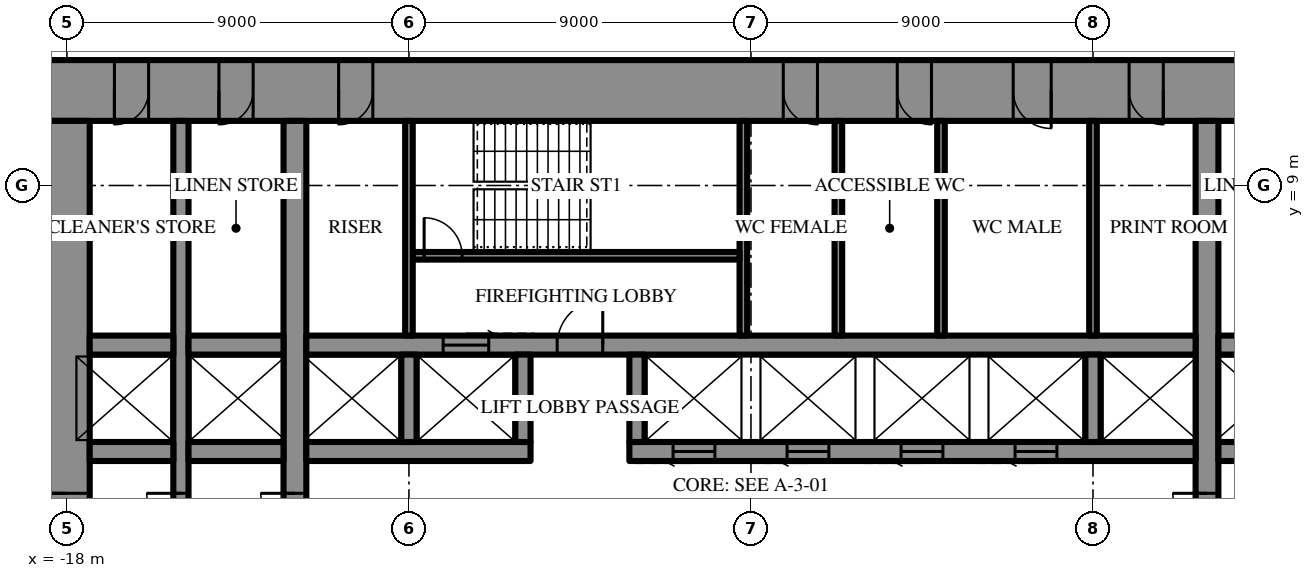
"""IFC4 building model, lengths in metres.
Left out: names, types, materials, properties, quantities, classifications, styles, units other than length and angle.
Written with IfcOpenShell. Run it as: python <this file> out.ifc"""

import sys

from ifc_helpers import new_model, si_unit, direction, frame, frame_2d, origin, place, context, subcontext, project, spatial, rectangle, extrude, element, fill, save


model = new_model("IFC4")
c1 = context("Model", 3, precision=1e-05, world=origin(), true_north=direction((0.0, 1.0)))
c2 = subcontext(c1, "Body", "Model", "MODEL_VIEW")
j1 = project(units=[si_unit("LENGTHUNIT", "METRE"), si_unit("PLANEANGLEUNIT", "RADIAN")], contexts=[c1])
p1 = place(None, origin())
s1 = spatial("IfcSite", under=j1, at=p1, CompositionType="ELEMENT")
p2 = place(p1, origin())
s2 = spatial("IfcBuilding", under=s1, at=p2, CompositionType="ELEMENT")
p3 = place(p2, frame((0.0, 0.0, 94.9)))
s3 = spatial("IfcBuildingStorey", under=s2, at=p3, CompositionType="ELEMENT", Elevation=94.9)
p4 = place(p3, frame((-18.6, 11.5, 0.0), z_axis=(0.0, 0.0, 1.0), x_axis=(1.0, 0.0, 0.0)))
e1 = element("IfcWall", 1, at=p4, inside=s3, PredefinedType="SHEAR", context=c2, shape_type="SweptSolid", body=[
    extrude(rectangle(XDim=37.2, YDim=1.6, at=frame_2d((18.6, 0.0))), origin(), (0.0, 0.0, 1.0), 4.2),
])
p5 = place(p4, frame((19.45, 0.0, 0.0)))
e2 = element("IfcOpeningElement", 2, at=p5, cuts=e1, PredefinedType="OPENING", context=c2, shape_type="SweptSolid", body=[
    extrude(rectangle(XDim=0.9, YDim=2.2, at=frame_2d((0.45, 1.1))), frame((0.0, 0.81, 0.0), z_axis=(0.0, -1.0, 0.0), x_axis=(1.0, 0.0, 0.0)), (0.0, 0.0, 1.0), 1.62),
])
p6 = place(p4, frame((22.45, 0.0, 0.0)))
e3 = element("IfcOpeningElement", 3, at=p6, cuts=e1, PredefinedType="OPENING", context=c2, shape_type="SweptSolid", body=[
    extrude(rectangle(XDim=0.9, YDim=2.2, at=frame_2d((0.45, 1.1))), frame((0.0, 0.81, 0.0), z_axis=(0.0, -1.0, 0.0), x_axis=(1.0, 0.0, 0.0)), (0.0, 0.0, 1.0), 1.62),
])
p7 = place(p4, frame((25.5, 0.0, 0.0)))
e4 = element("IfcOpeningElement", 4, at=p7, cuts=e1, PredefinedType="OPENING", context=c2, shape_type="SweptSolid", body=[
    extrude(rectangle(XDim=1.0, YDim=2.2, at=frame_2d((0.5, 1.1))), frame((0.0, 0.81, 0.0), z_axis=(0.0, -1.0, 0.0), x_axis=(1.0, 0.0, 0.0)), (0.0, 0.0, 1.0), 1.62),
])
p8 = place(p4, frame((1.85, 0.0, 0.0)))
e5 = element("IfcOpeningElement", 5, at=p8, cuts=e1, PredefinedType="OPENING", context=c2, shape_type="SweptSolid", body=[
    extrude(rectangle(XDim=0.9, YDim=2.2, at=frame_2d((0.45, 1.1))), frame((0.0, 0.81, 0.0), z_axis=(0.0, -1.0, 0.0), x_axis=(1.0, 0.0, 0.0)), (0.0, 0.0, 1.0), 1.62),
])
p9 = place(p4, frame((4.6, 0.0, 0.0)))
e6 = element("IfcOpeningElement", 6, at=p9, cuts=e1, PredefinedType="OPENING", context=c2, shape_type="SweptSolid", body=[
    extrude(rectangle(XDim=0.9, YDim=2.2, at=frame_2d((0.45, 1.1))), frame((0.0, 0.81, 0.0), z_axis=(0.0, -1.0, 0.0), x_axis=(1.0, 0.0, 0.0)), (0.0, 0.0, 1.0), 1.62),
])
p10 = place(p4, frame((7.75, 0.0, 0.0)))
e7 = element("IfcOpeningElement", 7, at=p10, cuts=e1, PredefinedType="OPENING", context=c2, shape_type="SweptSolid", body=[
    extrude(rectangle(XDim=0.9, YDim=2.2, at=frame_2d((0.45, 1.1))), frame((0.0, 0.81, 0.0), z_axis=(0.0, -1.0, 0.0), x_axis=(1.0, 0.0, 0.0)), (0.0, 0.0, 1.0), 1.62),
])
p11 = place(p4, frame((28.55, 0.0, 0.0)))
e8 = element("IfcOpeningElement", 8, at=p11, cuts=e1, PredefinedType="OPENING", context=c2, shape_type="SweptSolid", body=[
    extrude(rectangle(XDim=0.9, YDim=2.2, at=frame_2d((0.45, 1.1))), frame((0.0, 0.81, 0.0), z_axis=(0.0, -1.0, 0.0), x_axis=(1.0, 0.0, 0.0)), (0.0, 0.0, 1.0), 1.62),
])
p12 = place(p4, frame((31.7, 0.0, 0.0)))
e9 = element("IfcOpeningElement", 9, at=p12, cuts=e1, PredefinedType="OPENING", context=c2, shape_type="SweptSolid", body=[
    extrude(rectangle(XDim=0.9, YDim=2.2, at=frame_2d((0.45, 1.1))), frame((0.0, 0.81, 0.0), z_axis=(0.0, -1.0, 0.0), x_axis=(1.0, 0.0, 0.0)), (0.0, 0.0, 1.0), 1.62),
])
p13 = place(p4, frame((34.45, 0.0, 0.0)))
e10 = element("IfcOpeningElement", 10, at=p13, cuts=e1, PredefinedType="OPENING", context=c2, shape_type="SweptSolid", body=[
    extrude(rectangle(XDim=0.9, YDim=2.2, at=frame_2d((0.45, 1.1))), frame((0.0, 0.81, 0.0), z_axis=(0.0, -1.0, 0.0), x_axis=(1.0, 0.0, 0.0)), (0.0, 0.0, 1.0), 1.62),
])
p14 = place(p3, frame((-18.0, 10.7, 0.0), z_axis=(0.0, 0.0, 1.0), x_axis=(0.0, -1.0, 0.0)))
e11 = element("IfcWall", 11, at=p14, inside=s3, PredefinedType="SHEAR", context=c2, shape_type="SweptSolid", body=[
    extrude(rectangle(XDim=21.4, YDim=1.2, at=frame_2d((10.7, 0.0))), origin(), (0.0, 0.0, 1.0), 4.2),
])
p15 = place(p14, frame((9.8, 0.0, 0.0)))
e12 = element("IfcOpeningElement", 12, at=p15, cuts=e11, PredefinedType="OPENING", context=c2, shape_type="SweptSolid", body=[
    extrude(rectangle(XDim=1.8, YDim=2.4, at=frame_2d((0.9, 1.2))), frame((0.0, 0.61, 0.0), z_axis=(0.0, -1.0, 0.0), x_axis=(1.0, 0.0, 0.0)), (0.0, 0.0, 1.0), 1.22),
])
p16 = place(p3, frame((12.0, -10.7, 0.0), z_axis=(0.0, 0.0, 1.0), x_axis=(0.0, 1.0, 0.0)))
e13 = element("IfcWall", 13, at=p16, inside=s3, PredefinedType="SHEAR", context=c2, shape_type="SweptSolid", body=[
    extrude(rectangle(XDim=21.4, YDim=0.6, at=frame_2d((10.7, 0.0))), origin(), (0.0, 0.0, 1.0), 4.2),
])
p17 = place(p16, frame((9.8, 0.0, 0.0)))
e14 = element("IfcOpeningElement", 14, at=p17, cuts=e13, PredefinedType="OPENING", context=c2, shape_type="SweptSolid", body=[
    extrude(rectangle(XDim=1.8, YDim=2.4, at=frame_2d((0.9, 1.2))), frame((0.0, 0.31, 0.0), z_axis=(0.0, -1.0, 0.0), x_axis=(1.0, 0.0, 0.0)), (0.0, 0.0, 1.0), 0.62),
])
p18 = place(p3, frame((-12.0, -10.7, 0.0), z_axis=(0.0, 0.0, 1.0), x_axis=(0.0, 1.0, 0.0)))
e15 = element("IfcWall", 15, at=p18, inside=s3, PredefinedType="SHEAR", context=c2, shape_type="SweptSolid", body=[
    extrude(rectangle(XDim=21.4, YDim=0.6, at=frame_2d((10.7, 0.0))), origin(), (0.0, 0.0, 1.0), 4.2),
])
p19 = place(p18, frame((9.8, 0.0, 0.0)))
e16 = element("IfcOpeningElement", 16, at=p19, cuts=e15, PredefinedType="OPENING", context=c2, shape_type="SweptSolid", body=[
    extrude(rectangle(XDim=1.8, YDim=2.4, at=frame_2d((0.9, 1.2))), frame((0.0, 0.31, 0.0), z_axis=(0.0, -1.0, 0.0), x_axis=(1.0, 0.0, 0.0)), (0.0, 0.0, 1.0), 0.62),
])
p20 = place(p3, frame((-15.0, -10.7, 0.0), z_axis=(0.0, 0.0, 1.0), x_axis=(0.0, 1.0, 0.0)))
e17 = element("IfcWall", 17, at=p20, inside=s3, PredefinedType="SHEAR", context=c2, shape_type="SweptSolid", body=[
    extrude(rectangle(XDim=21.4, YDim=0.4, at=frame_2d((10.7, 0.0))), origin(), (0.0, 0.0, 1.0), 4.2),
])
p21 = place(p20, frame((9.8, 0.0, 0.0)))
e18 = element("IfcOpeningElement", 18, at=p21, cuts=e17, PredefinedType="OPENING", context=c2, shape_type="SweptSolid", body=[
    extrude(rectangle(XDim=1.8, YDim=2.4, at=frame_2d((0.9, 1.2))), frame((0.0, 0.21, 0.0), z_axis=(0.0, -1.0, 0.0), x_axis=(1.0, 0.0, 0.0)), (0.0, 0.0, 1.0), 0.42),
])
p22 = place(p3, frame((-17.4, 2.0, 0.0), z_axis=(0.0, 0.0, 1.0), x_axis=(1.0, 0.0, 0.0)))
e19 = element("IfcWall", 19, at=p22, inside=s3, PredefinedType="SHEAR", context=c2, shape_type="SweptSolid", body=[
    extrude(rectangle(XDim=2.2, YDim=0.5, at=frame_2d((1.1, 0.0))), origin(), (0.0, 0.0, 1.0), 4.2),
])
p23 = place(p3, frame((-14.8, 2.0, 0.0), z_axis=(0.0, 0.0, 1.0), x_axis=(1.0, 0.0, 0.0)))
e20 = element("IfcWall", 20, at=p23, inside=s3, PredefinedType="SHEAR", context=c2, shape_type="SweptSolid", body=[
    extrude(rectangle(XDim=2.5, YDim=0.5, at=frame_2d((1.25, 0.0))), origin(), (0.0, 0.0, 1.0), 4.2),
])
p24 = place(p3, frame((-11.7, 2.0, 0.0), z_axis=(0.0, 0.0, 1.0), x_axis=(1.0, 0.0, 0.0)))
e21 = element("IfcWall", 21, at=p24, inside=s3, PredefinedType="SHEAR", context=c2, shape_type="SweptSolid", body=[
    extrude(rectangle(XDim=5.9, YDim=0.5, at=frame_2d((2.95, 0.0))), origin(), (0.0, 0.0, 1.0), 4.2),
])
p25 = place(p3, frame((-3.2, 2.0, 0.0), z_axis=(0.0, 0.0, 1.0), x_axis=(1.0, 0.0, 0.0)))
e22 = element("IfcWall", 22, at=p25, inside=s3, PredefinedType="SHEAR", context=c2, shape_type="SweptSolid", body=[
    extrude(rectangle(XDim=14.9, YDim=0.5, at=frame_2d((7.45, 0.0))), origin(), (0.0, 0.0, 1.0), 4.2),
])
p26 = place(p25, frame((1.15, 0.0, 0.0)))
e23 = element("IfcOpeningElement", 23, at=p26, cuts=e22, PredefinedType="OPENING", context=c2, shape_type="SweptSolid", body=[
    extrude(rectangle(XDim=1.1, YDim=2.2, at=frame_2d((0.55, 1.1))), frame((0.0, 0.26, 0.0), z_axis=(0.0, -1.0, 0.0), x_axis=(1.0, 0.0, 0.0)), (0.0, 0.0, 1.0), 0.52),
])
p27 = place(p25, frame((4.15, 0.0, 0.0)))
e24 = element("IfcOpeningElement", 24, at=p27, cuts=e22, PredefinedType="OPENING", context=c2, shape_type="SweptSolid", body=[
    extrude(rectangle(XDim=1.1, YDim=2.2, at=frame_2d((0.55, 1.1))), frame((0.0, 0.26, 0.0), z_axis=(0.0, -1.0, 0.0), x_axis=(1.0, 0.0, 0.0)), (0.0, 0.0, 1.0), 0.52),
])
p28 = place(p25, frame((7.15, 0.0, 0.0)))
e25 = element("IfcOpeningElement", 25, at=p28, cuts=e22, PredefinedType="OPENING", context=c2, shape_type="SweptSolid", body=[
    extrude(rectangle(XDim=1.1, YDim=2.2, at=frame_2d((0.55, 1.1))), frame((0.0, 0.26, 0.0), z_axis=(0.0, -1.0, 0.0), x_axis=(1.0, 0.0, 0.0)), (0.0, 0.0, 1.0), 0.52),
])
p29 = place(p25, frame((10.15, 0.0, 0.0)))
e26 = element("IfcOpeningElement", 26, at=p29, cuts=e22, PredefinedType="OPENING", context=c2, shape_type="SweptSolid", body=[
    extrude(rectangle(XDim=1.1, YDim=2.2, at=frame_2d((0.55, 1.1))), frame((0.0, 0.26, 0.0), z_axis=(0.0, -1.0, 0.0), x_axis=(1.0, 0.0, 0.0)), (0.0, 0.0, 1.0), 0.52),
])
p30 = place(p3, frame((12.3, 2.0, 0.0), z_axis=(0.0, 0.0, 1.0), x_axis=(1.0, 0.0, 0.0)))
e27 = element("IfcWall", 27, at=p30, inside=s3, PredefinedType="SHEAR", context=c2, shape_type="SweptSolid", body=[
    extrude(rectangle(XDim=2.5, YDim=0.5, at=frame_2d((1.25, 0.0))), origin(), (0.0, 0.0, 1.0), 4.2),
])
p31 = place(p3, frame((-17.4, 4.8, 0.0), z_axis=(0.0, 0.0, 1.0), x_axis=(1.0, 0.0, 0.0)))
e28 = element("IfcWall", 28, at=p31, inside=s3, PredefinedType="SHEAR", context=c2, shape_type="SweptSolid", body=[
    extrude(rectangle(XDim=2.2, YDim=0.5, at=frame_2d((1.1, 0.0))), origin(), (0.0, 0.0, 1.0), 4.2),
])
p32 = place(p3, frame((-14.8, 4.8, 0.0), z_axis=(0.0, 0.0, 1.0), x_axis=(1.0, 0.0, 0.0)))
e29 = element("IfcWall", 29, at=p32, inside=s3, PredefinedType="SHEAR", context=c2, shape_type="SweptSolid", body=[
    extrude(rectangle(XDim=2.5, YDim=0.5, at=frame_2d((1.25, 0.0))), origin(), (0.0, 0.0, 1.0), 4.2),
])
p33 = place(p3, frame((-11.7, 4.8, 0.0), z_axis=(0.0, 0.0, 1.0), x_axis=(1.0, 0.0, 0.0)))
e30 = element("IfcWall", 30, at=p33, inside=s3, PredefinedType="SHEAR", context=c2, shape_type="SweptSolid", body=[
    extrude(rectangle(XDim=23.4, YDim=0.5, at=frame_2d((11.7, 0.0))), origin(), (0.0, 0.0, 1.0), 4.2),
])
p34 = place(p33, frame((6.6, 0.0, 0.0)))
e31 = element("IfcOpeningElement", 31, at=p34, cuts=e30, PredefinedType="OPENING", context=c2, shape_type="SweptSolid", body=[
    extrude(rectangle(XDim=1.2, YDim=2.2, at=frame_2d((0.6, 1.1))), frame((0.0, 0.26, 0.0), z_axis=(0.0, -1.0, 0.0), x_axis=(1.0, 0.0, 0.0)), (0.0, 0.0, 1.0), 0.52),
])
p35 = place(p33, frame((3.6, 0.0, 0.0)))
e32 = element("IfcOpeningElement", 32, at=p35, cuts=e30, PredefinedType="OPENING", context=c2, shape_type="SweptSolid", body=[
    extrude(rectangle(XDim=1.2, YDim=2.2, at=frame_2d((0.6, 1.1))), frame((0.0, 0.26, 0.0), z_axis=(0.0, -1.0, 0.0), x_axis=(1.0, 0.0, 0.0)), (0.0, 0.0, 1.0), 0.52),
])
p36 = place(p3, frame((12.3, 4.8, 0.0), z_axis=(0.0, 0.0, 1.0), x_axis=(1.0, 0.0, 0.0)))
e33 = element("IfcWall", 33, at=p36, inside=s3, PredefinedType="SHEAR", context=c2, shape_type="SweptSolid", body=[
    extrude(rectangle(XDim=2.5, YDim=0.5, at=frame_2d((1.25, 0.0))), origin(), (0.0, 0.0, 1.0), 4.2),
])
for number, where, z_axis, x_axis in (
    (34, (-9.0, 2.25, 0.0), (0.0, 0.0, 1.0), (0.0, 1.0, 0.0)),
    (35, (-6.0, 2.25, 0.0), (0.0, 0.0, 1.0), (0.0, 1.0, 0.0)),
    (36, (-3.0, 2.25, 0.0), (0.0, 0.0, 1.0), (0.0, 1.0, 0.0)),
    (37, (9.0, 2.25, 0.0), (0.0, 0.0, 1.0), (0.0, 1.0, 0.0)),
):
    element("IfcWall", number, at=place(p3, frame(where, z_axis=z_axis, x_axis=x_axis)), inside=s3, PredefinedType="SHEAR", context=c2, shape_type="SweptSolid", body=[
        extrude(rectangle(XDim=2.3, YDim=0.4, at=frame_2d((1.15, 0.0))), origin(), (0.0, 0.0, 1.0), 4.2),
    ])
p37 = place(p3, frame((-0.2, 5.05, 0.0), z_axis=(0.0, 0.0, 1.0), x_axis=(0.0, 1.0, 0.0)))
e38 = element("IfcWall", 38, at=p37, inside=s3, PredefinedType="SHEAR", context=c2, shape_type="SweptSolid", body=[
    extrude(rectangle(XDim=5.65, YDim=0.2, at=frame_2d((2.825, 0.0))), origin(), (0.0, 0.0, 1.0), 4.2),
])
p38 = place(p3, frame((-8.9, 7.15, 0.0), z_axis=(0.0, 0.0, 1.0), x_axis=(1.0, 0.0, 0.0)))
e39 = element("IfcWall", 39, at=p38, inside=s3, PredefinedType="SHEAR", context=c2, shape_type="SweptSolid", body=[
    extrude(rectangle(XDim=8.6, YDim=0.2, at=frame_2d((4.3, 0.0))), origin(), (0.0, 0.0, 1.0), 4.2),
])
p39 = place(p38, frame((0.3, 0.0, 0.0)))
e40 = element("IfcOpeningElement", 40, at=p39, cuts=e39, PredefinedType="OPENING", context=c2, shape_type="SweptSolid", body=[
    extrude(rectangle(XDim=1.0, YDim=2.2, at=frame_2d((0.5, 1.1))), frame((0.0, 0.11, 0.0), z_axis=(0.0, -1.0, 0.0), x_axis=(1.0, 0.0, 0.0)), (0.0, 0.0, 1.0), 0.22),
])
for number, where, z_axis, x_axis in (
    (41, (-9.0, 5.05, 0.0), (0.0, 0.0, 1.0), (0.0, 1.0, 0.0)),
    (42, (9.0, 5.05, 0.0), (0.0, 0.0, 1.0), (0.0, 1.0, 0.0)),
    (43, (2.3, 5.05, 0.0), (0.0, 0.0, 1.0), (0.0, 1.0, 0.0)),
    (44, (5.0, 5.05, 0.0), (0.0, 0.0, 1.0), (0.0, 1.0, 0.0)),
):
    element("IfcWall", number, at=place(p3, frame(where, z_axis=z_axis, x_axis=x_axis)), inside=s3, PredefinedType="PARTITIONING", context=c2, shape_type="SweptSolid", body=[
        extrude(rectangle(XDim=5.65, YDim=0.2, at=frame_2d((2.825, 0.0))), origin(), (0.0, 0.0, 1.0), 4.0),
    ])
p40 = place(p15, frame((1.8, 0.0, 0.0), z_axis=(0.0, 0.0, 1.0), x_axis=(-1.0, 0.0, 0.0)))
e45 = element("IfcDoor", 45, at=p40, inside=s3, OperationType="DOUBLE_DOOR_SINGLE_SWING", PredefinedType="DOOR", context=c2, shape_type="SweptSolid", body=[
    extrude(rectangle(XDim=1.8, YDim=2.4, at=frame_2d((0.9, 1.2))), frame((0.0, 0.025, 0.0), z_axis=(0.0, -1.0, 0.0), x_axis=(1.0, 0.0, 0.0)), (0.0, 0.0, 1.0), 0.05),
])
fill(e12, e45)
p41 = place(p34, origin())
e46 = element("IfcDoor", 46, at=p41, inside=s3, OperationType="SINGLE_SWING_LEFT", PredefinedType="DOOR", context=c2, shape_type="SweptSolid", body=[
    extrude(rectangle(XDim=1.2, YDim=2.2, at=frame_2d((0.6, 1.1))), frame((0.0, 0.025, 0.0), z_axis=(0.0, -1.0, 0.0), x_axis=(1.0, 0.0, 0.0)), (0.0, 0.0, 1.0), 0.05),
])
fill(e31, e46)
p42 = place(p39, origin())
e47 = element("IfcDoor", 47, at=p42, inside=s3, OperationType="SINGLE_SWING_RIGHT", PredefinedType="DOOR", context=c2, shape_type="SweptSolid", body=[
    extrude(rectangle(XDim=1.0, YDim=2.2, at=frame_2d((0.5, 1.1))), frame((0.0, 0.025, 0.0), z_axis=(0.0, -1.0, 0.0), x_axis=(1.0, 0.0, 0.0)), (0.0, 0.0, 1.0), 0.05),
])
fill(e40, e47)
p43 = place(p5, frame((0.9, 0.0, 0.0), z_axis=(0.0, 0.0, 1.0), x_axis=(-1.0, 0.0, 0.0)))
e48 = element("IfcDoor", 48, at=p43, inside=s3, OperationType="SINGLE_SWING_RIGHT", PredefinedType="DOOR", context=c2, shape_type="SweptSolid", body=[
    extrude(rectangle(XDim=0.9, YDim=2.2, at=frame_2d((0.45, 1.1))), frame((0.0, 0.025, 0.0), z_axis=(0.0, -1.0, 0.0), x_axis=(1.0, 0.0, 0.0)), (0.0, 0.0, 1.0), 0.05),
])
fill(e2, e48)
p44 = place(p6, frame((0.9, 0.0, 0.0), z_axis=(0.0, 0.0, 1.0), x_axis=(-1.0, 0.0, 0.0)))
e49 = element("IfcDoor", 49, at=p44, inside=s3, OperationType="SINGLE_SWING_RIGHT", PredefinedType="DOOR", context=c2, shape_type="SweptSolid", body=[
    extrude(rectangle(XDim=0.9, YDim=2.2, at=frame_2d((0.45, 1.1))), frame((0.0, 0.025, 0.0), z_axis=(0.0, -1.0, 0.0), x_axis=(1.0, 0.0, 0.0)), (0.0, 0.0, 1.0), 0.05),
])
fill(e3, e49)
p45 = place(p7, frame((1.0, 0.0, 0.0), z_axis=(0.0, 0.0, 1.0), x_axis=(-1.0, 0.0, 0.0)))
e50 = element("IfcDoor", 50, at=p45, inside=s3, OperationType="SINGLE_SWING_RIGHT", PredefinedType="DOOR", context=c2, shape_type="SweptSolid", body=[
    extrude(rectangle(XDim=1.0, YDim=2.2, at=frame_2d((0.5, 1.1))), frame((0.0, 0.025, 0.0), z_axis=(0.0, -1.0, 0.0), x_axis=(1.0, 0.0, 0.0)), (0.0, 0.0, 1.0), 0.05),
])
fill(e4, e50)
p46 = place(p8, frame((0.9, 0.0, 0.0), z_axis=(0.0, 0.0, 1.0), x_axis=(-1.0, 0.0, 0.0)))
e51 = element("IfcDoor", 51, at=p46, inside=s3, OperationType="SINGLE_SWING_LEFT", PredefinedType="DOOR", context=c2, shape_type="SweptSolid", body=[
    extrude(rectangle(XDim=0.9, YDim=2.2, at=frame_2d((0.45, 1.1))), frame((0.0, 0.025, 0.0), z_axis=(0.0, -1.0, 0.0), x_axis=(1.0, 0.0, 0.0)), (0.0, 0.0, 1.0), 0.05),
])
fill(e5, e51)
p47 = place(p9, frame((0.9, 0.0, 0.0), z_axis=(0.0, 0.0, 1.0), x_axis=(-1.0, 0.0, 0.0)))
e52 = element("IfcDoor", 52, at=p47, inside=s3, OperationType="SINGLE_SWING_LEFT", PredefinedType="DOOR", context=c2, shape_type="SweptSolid", body=[
    extrude(rectangle(XDim=0.9, YDim=2.2, at=frame_2d((0.45, 1.1))), frame((0.0, 0.025, 0.0), z_axis=(0.0, -1.0, 0.0), x_axis=(1.0, 0.0, 0.0)), (0.0, 0.0, 1.0), 0.05),
])
fill(e6, e52)
p48 = place(p10, frame((0.9, 0.0, 0.0), z_axis=(0.0, 0.0, 1.0), x_axis=(-1.0, 0.0, 0.0)))
e53 = element("IfcDoor", 53, at=p48, inside=s3, OperationType="SINGLE_SWING_LEFT", PredefinedType="DOOR", context=c2, shape_type="SweptSolid", body=[
    extrude(rectangle(XDim=0.9, YDim=2.2, at=frame_2d((0.45, 1.1))), frame((0.0, 0.025, 0.0), z_axis=(0.0, -1.0, 0.0), x_axis=(1.0, 0.0, 0.0)), (0.0, 0.0, 1.0), 0.05),
])
fill(e7, e53)
p49 = place(p11, frame((0.9, 0.0, 0.0), z_axis=(0.0, 0.0, 1.0), x_axis=(-1.0, 0.0, 0.0)))
e54 = element("IfcDoor", 54, at=p49, inside=s3, OperationType="SINGLE_SWING_RIGHT", PredefinedType="DOOR", context=c2, shape_type="SweptSolid", body=[
    extrude(rectangle(XDim=0.9, YDim=2.2, at=frame_2d((0.45, 1.1))), frame((0.0, 0.025, 0.0), z_axis=(0.0, -1.0, 0.0), x_axis=(1.0, 0.0, 0.0)), (0.0, 0.0, 1.0), 0.05),
])
fill(e8, e54)
p50 = place(p17, origin())
e55 = element("IfcDoor", 55, at=p50, inside=s3, OperationType="DOUBLE_DOOR_SINGLE_SWING", PredefinedType="DOOR", context=c2, shape_type="SweptSolid", body=[
    extrude(rectangle(XDim=1.8, YDim=2.4, at=frame_2d((0.9, 1.2))), frame((0.0, 0.025, 0.0), z_axis=(0.0, -1.0, 0.0), x_axis=(1.0, 0.0, 0.0)), (0.0, 0.0, 1.0), 0.05),
])
fill(e14, e55)
p51 = place(p19, origin())
e56 = element("IfcDoor", 56, at=p51, inside=s3, OperationType="DOUBLE_DOOR_SINGLE_SWING", PredefinedType="DOOR", context=c2, shape_type="SweptSolid", body=[
    extrude(rectangle(XDim=1.8, YDim=2.4, at=frame_2d((0.9, 1.2))), frame((0.0, 0.025, 0.0), z_axis=(0.0, -1.0, 0.0), x_axis=(1.0, 0.0, 0.0)), (0.0, 0.0, 1.0), 0.05),
])
fill(e16, e56)
p52 = place(p21, origin())
e57 = element("IfcDoor", 57, at=p52, inside=s3, OperationType="DOUBLE_DOOR_SINGLE_SWING", PredefinedType="DOOR", context=c2, shape_type="SweptSolid", body=[
    extrude(rectangle(XDim=1.8, YDim=2.4, at=frame_2d((0.9, 1.2))), frame((0.0, 0.025, 0.0), z_axis=(0.0, -1.0, 0.0), x_axis=(1.0, 0.0, 0.0)), (0.0, 0.0, 1.0), 0.05),
])
fill(e18, e57)
p53 = place(p35, origin())
e58 = element("IfcDoor", 58, at=p53, inside=s3, OperationType="SLIDING_TO_LEFT", PredefinedType="DOOR", context=c2, shape_type="SweptSolid", body=[
    extrude(rectangle(XDim=1.2, YDim=2.2, at=frame_2d((0.6, 1.1))), frame((0.0, 0.025, 0.0), z_axis=(0.0, -1.0, 0.0), x_axis=(1.0, 0.0, 0.0)), (0.0, 0.0, 1.0), 0.05),
])
fill(e32, e58)
p54 = place(p26, frame((1.1, 0.0, 0.0), z_axis=(0.0, 0.0, 1.0), x_axis=(-1.0, 0.0, 0.0)))
e59 = element("IfcDoor", 59, at=p54, inside=s3, OperationType="SLIDING_TO_LEFT", PredefinedType="DOOR", context=c2, shape_type="SweptSolid", body=[
    extrude(rectangle(XDim=1.1, YDim=2.2, at=frame_2d((0.55, 1.1))), frame((0.0, 0.025, 0.0), z_axis=(0.0, -1.0, 0.0), x_axis=(1.0, 0.0, 0.0)), (0.0, 0.0, 1.0), 0.05),
])
fill(e23, e59)
p55 = place(p27, frame((1.1, 0.0, 0.0), z_axis=(0.0, 0.0, 1.0), x_axis=(-1.0, 0.0, 0.0)))
e60 = element("IfcDoor", 60, at=p55, inside=s3, OperationType="SLIDING_TO_LEFT", PredefinedType="DOOR", context=c2, shape_type="SweptSolid", body=[
    extrude(rectangle(XDim=1.1, YDim=2.2, at=frame_2d((0.55, 1.1))), frame((0.0, 0.025, 0.0), z_axis=(0.0, -1.0, 0.0), x_axis=(1.0, 0.0, 0.0)), (0.0, 0.0, 1.0), 0.05),
])
fill(e24, e60)
p56 = place(p28, frame((1.1, 0.0, 0.0), z_axis=(0.0, 0.0, 1.0), x_axis=(-1.0, 0.0, 0.0)))
e61 = element("IfcDoor", 61, at=p56, inside=s3, OperationType="SLIDING_TO_LEFT", PredefinedType="DOOR", context=c2, shape_type="SweptSolid", body=[
    extrude(rectangle(XDim=1.1, YDim=2.2, at=frame_2d((0.55, 1.1))), frame((0.0, 0.025, 0.0), z_axis=(0.0, -1.0, 0.0), x_axis=(1.0, 0.0, 0.0)), (0.0, 0.0, 1.0), 0.05),
])
fill(e25, e61)
p57 = place(p29, frame((1.1, 0.0, 0.0), z_axis=(0.0, 0.0, 1.0), x_axis=(-1.0, 0.0, 0.0)))
e62 = element("IfcDoor", 62, at=p57, inside=s3, OperationType="SLIDING_TO_LEFT", PredefinedType="DOOR", context=c2, shape_type="SweptSolid", body=[
    extrude(rectangle(XDim=1.1, YDim=2.2, at=frame_2d((0.55, 1.1))), frame((0.0, 0.025, 0.0), z_axis=(0.0, -1.0, 0.0), x_axis=(1.0, 0.0, 0.0)), (0.0, 0.0, 1.0), 0.05),
])
fill(e26, e62)
save(model, sys.argv[1])
